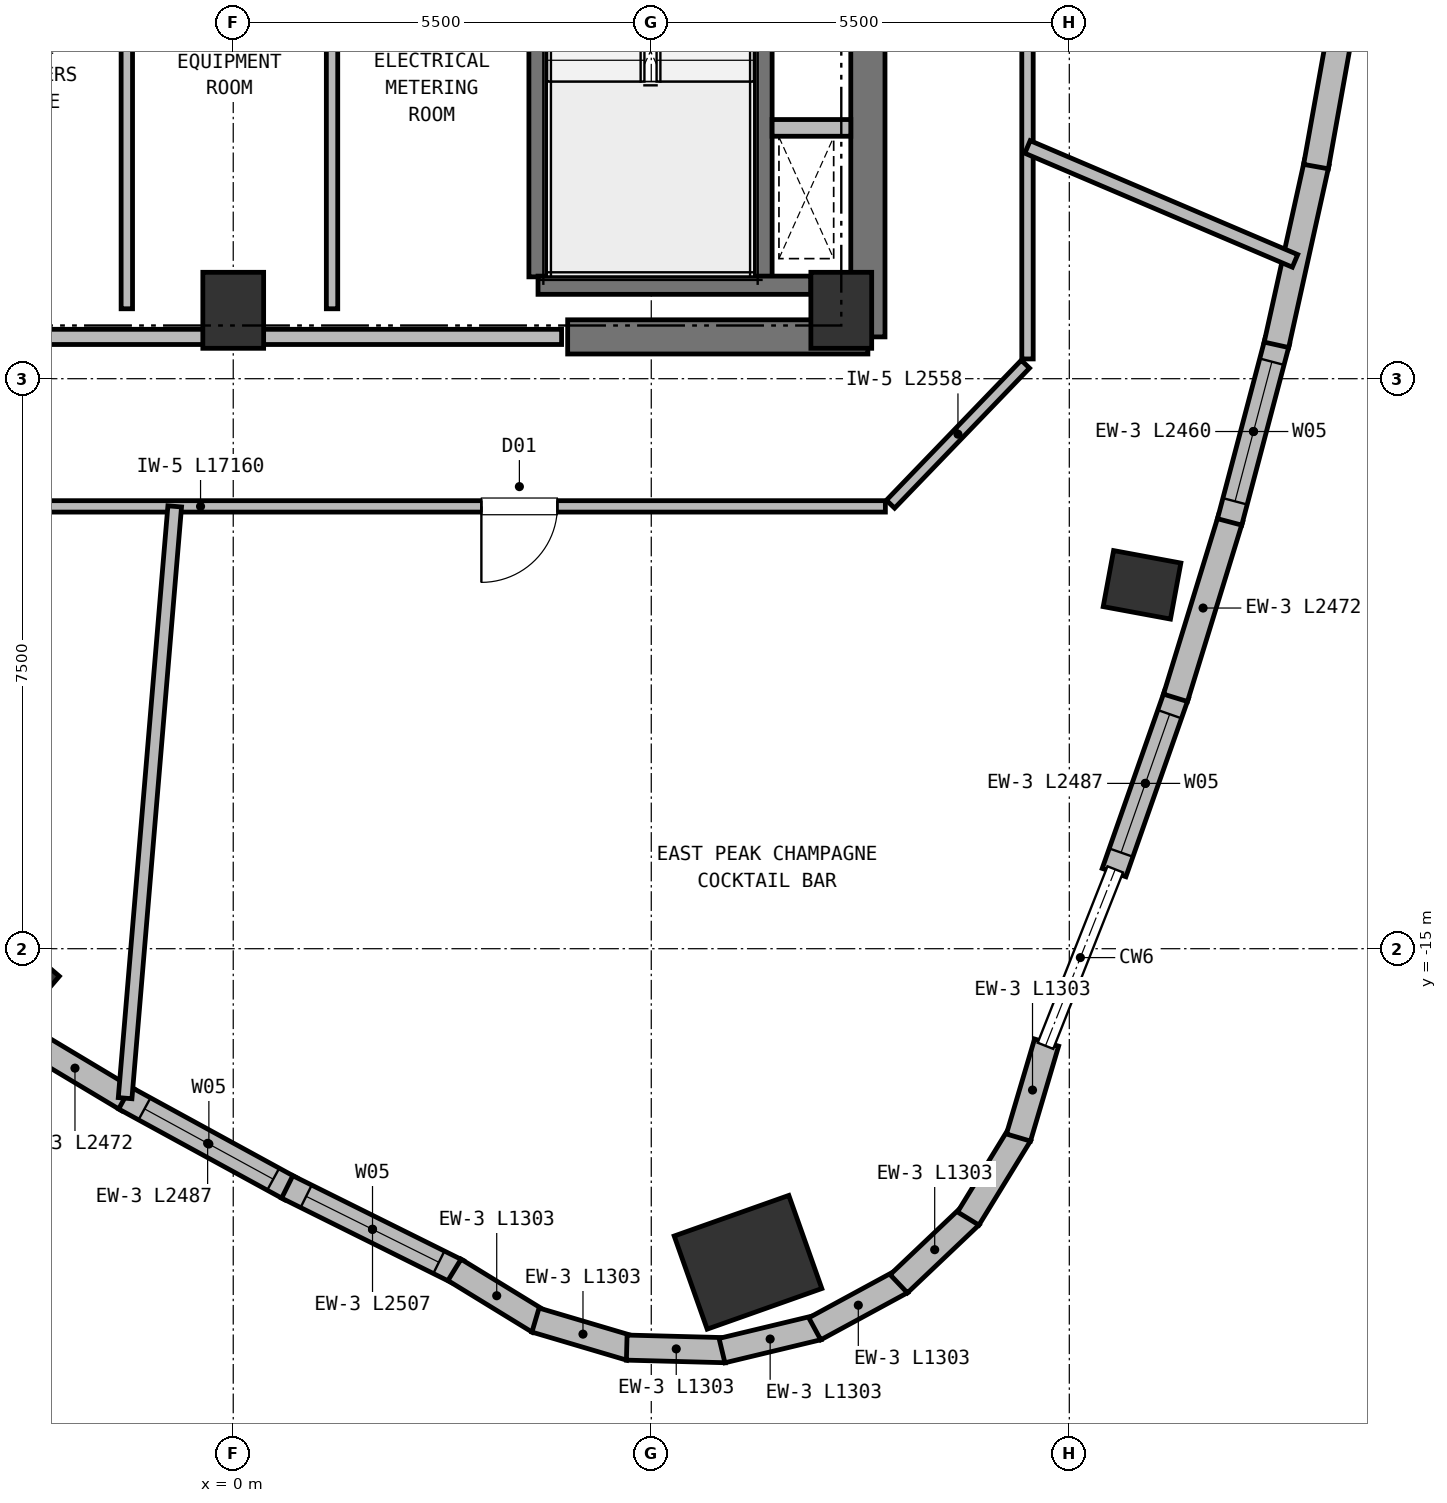
"""IFC4 building model, lengths in metres.
Left out: names, types, materials, properties, quantities, classifications, styles, units other than length and angle.
Written with IfcOpenShell. Run it as: python <this file> out.ifc"""

import sys

from ifc_helpers import new_model, si_unit, direction, frame, frame_2d, origin, origin_2d, place, context, subcontext, project, spatial, rectangle, extrude, element, fill, save


model = new_model("IFC4")
c1 = context("Model", 3, precision=1e-05, world=origin(), true_north=direction((0.0, 1.0)))
c2 = subcontext(c1, "Body", "Model", "MODEL_VIEW")
j1 = project(units=[si_unit("LENGTHUNIT", "METRE"), si_unit("PLANEANGLEUNIT", "RADIAN")], contexts=[c1])
p1 = place(None, origin())
s1 = spatial("IfcSite", under=j1, at=p1, CompositionType="ELEMENT")
p2 = place(p1, origin())
s2 = spatial("IfcBuilding", under=s1, at=p2, CompositionType="ELEMENT")
p3 = place(p2, frame((0.0, 0.0, 281.6)))
s3 = spatial("IfcBuildingStorey", under=s2, at=p3, CompositionType="ELEMENT", Elevation=281.6)
for number, where, z_axis, x_axis in (
    (1, (0.0, -6.6, 0.0), (0.0, 0.0, 1.0), (1.0, 0.0, 0.0)),
    (2, (8.0, -6.6, 0.0), (0.0, 0.0, 1.0), (1.0, 0.0, 0.0)),
):
    element("IfcColumn", number, at=place(p3, frame(where, z_axis=z_axis, x_axis=x_axis)), inside=s3, PredefinedType="COLUMN", context=c2, shape_type="SweptSolid", body=[
        extrude(rectangle(XDim=0.8, YDim=1.0, at=origin_2d()), origin(), (0.0, 0.0, 1.0), 4.4),
    ])
p4 = place(p3, frame((4.4, -6.95, 0.0), z_axis=(0.0, 0.0, 1.0), x_axis=(1.0, 0.0, 0.0)))
e3 = element("IfcWall", 3, at=p4, inside=s3, PredefinedType="SHEAR", context=c2, shape_type="SweptSolid", body=[
    extrude(rectangle(XDim=3.95, YDim=0.45, at=frame_2d((1.975, 0.0))), origin(), (0.0, 0.0, 1.0), 4.13),
])
p5 = place(p3, frame((8.35, -6.95, 0.0), z_axis=(0.0, 0.0, 1.0), x_axis=(0.0, 1.0, 0.0)))
e4 = element("IfcWall", 4, at=p5, inside=s3, PredefinedType="SHEAR", context=c2, shape_type="SweptSolid", body=[
    extrude(rectangle(XDim=8.1, YDim=0.45, at=frame_2d((4.05, 0.0))), origin(), (0.0, 0.0, 1.0), 4.13),
])
p6 = place(p3, frame((-2.865, -15.461, 0.0), z_axis=(0.0, 0.0, 1.0), x_axis=(-0.7604059656, 0.64944804833, 0.0)))
e5 = element("IfcColumn", 5, at=p6, inside=s3, PredefinedType="COLUMN", context=c2, shape_type="SweptSolid", body=[
    extrude(rectangle(XDim=0.75, YDim=0.9, at=origin_2d()), origin(), (0.0, 0.0, 1.0), 4.4),
])
p7 = place(p3, frame((6.773, -19.126, 0.0), z_axis=(0.0, 0.0, 1.0), x_axis=(-0.333806859234, 0.942641491092, 0.0)))
e6 = element("IfcColumn", 6, at=p7, inside=s3, PredefinedType="COLUMN", context=c2, shape_type="SweptSolid", body=[
    extrude(rectangle(XDim=1.3, YDim=1.6, at=origin_2d()), origin(), (0.0, 0.0, 1.0), 4.4),
])
p8 = place(p3, frame((11.957, -10.212, 0.0), z_axis=(0.0, 0.0, 1.0), x_axis=(0.182235525492, 0.983254907564, 0.0)))
e7 = element("IfcColumn", 7, at=p8, inside=s3, PredefinedType="COLUMN", context=c2, shape_type="SweptSolid", body=[
    extrude(rectangle(XDim=0.75, YDim=0.9, at=origin_2d()), origin(), (0.0, 0.0, 1.0), 4.4),
])
p9 = place(p3, frame((-1.385, -16.989, 0.0), z_axis=(0.0, 0.0, 1.0), x_axis=(-0.857841338579, 0.513914621143, 0.0)))
e8 = element("IfcWall", 8, at=p9, inside=s3, PredefinedType="SOLIDWALL", context=c2, shape_type="SweptSolid", body=[
    extrude(rectangle(XDim=2.472, YDim=0.33, at=frame_2d((1.236, 0.0))), origin(), (0.0, 0.0, 1.0), 4.13),
])
p10 = place(p3, frame((0.754, -18.157, 0.0), z_axis=(0.0, 0.0, 1.0), x_axis=(-0.877475074231, 0.479622241044, 0.0)))
e9 = element("IfcWall", 9, at=p10, inside=s3, PredefinedType="SOLIDWALL", context=c2, shape_type="SweptSolid", body=[
    extrude(rectangle(XDim=2.487, YDim=0.33, at=frame_2d((1.244, 0.0))), origin(), (0.0, 0.0, 1.0), 4.13),
])
p11 = place(p10, frame((0.26, 0.0, 0.72)))
e10 = element("IfcOpeningElement", 10, at=p11, cuts=e9, PredefinedType="OPENING", context=c2, shape_type="SweptSolid", body=[
    extrude(rectangle(XDim=1.93, YDim=2.15, at=frame_2d((0.965, 1.075))), frame((0.0, 0.175, 0.0), z_axis=(0.0, -1.0, 0.0), x_axis=(1.0, 0.0, 0.0)), (0.0, 0.0, 1.0), 0.35),
])
p12 = place(p3, frame((2.955, -19.25, 0.0), z_axis=(0.0, 0.0, 1.0), x_axis=(-0.895515434076, 0.445030456634, 0.0)))
e11 = element("IfcWall", 11, at=p12, inside=s3, PredefinedType="SOLIDWALL", context=c2, shape_type="SweptSolid", body=[
    extrude(rectangle(XDim=2.507, YDim=0.33, at=frame_2d((1.253, 0.0))), origin(), (0.0, 0.0, 1.0), 4.13),
])
p13 = place(p12, frame((0.278, 0.0, 0.72)))
e12 = element("IfcOpeningElement", 12, at=p13, cuts=e11, PredefinedType="OPENING", context=c2, shape_type="SweptSolid", body=[
    extrude(rectangle(XDim=1.95, YDim=2.15, at=frame_2d((0.975, 1.075))), frame((0.0, 0.175, 0.0), z_axis=(0.0, -1.0, 0.0), x_axis=(1.0, 0.0, 0.0)), (0.0, 0.0, 1.0), 0.35),
])
for number, where, z_axis, x_axis in (
    (13, (4.022, -19.906, 0.0), (0.0, 0.0, 1.0), (-0.853, 0.523, 0.0)),
    (14, (5.226, -20.256, 0.0), (0.0, 0.0, 1.0), (-0.959, 0.284, 0.0)),
):
    element("IfcWall", number, at=place(p3, frame(where, z_axis=z_axis, x_axis=x_axis)), inside=s3, PredefinedType="SOLIDWALL", context=c2, shape_type="SweptSolid", body=[
        extrude(rectangle(XDim=1.303, YDim=0.33, at=frame_2d((0.652, 0.0))), origin(), (0.0, 0.0, 1.0), 4.13),
    ])
for number, where, z_axis, x_axis in (
    (15, (6.48, -20.283, 0.0), (0.0, 0.0, 1.0), (-1.0, 0.026, 0.0)),
    (16, (7.698, -19.984, 0.0), (0.0, 0.0, 1.0), (-0.972, -0.233, 0.0)),
    (17, (8.796, -19.38, 0.0), (0.0, 0.0, 1.0), (-0.879, -0.477, 0.0)),
):
    element("IfcWall", number, at=place(p3, frame(where, z_axis=z_axis, x_axis=x_axis)), inside=s3, PredefinedType="SOLIDWALL", context=c2, shape_type="SweptSolid", body=[
        extrude(rectangle(XDim=1.303, YDim=0.33, at=frame_2d((0.651, 0.0))), origin(), (0.0, 0.0, 1.0), 4.13),
    ])
p14 = place(p3, frame((9.701, -18.512, 0.0), z_axis=(0.0, 0.0, 1.0), x_axis=(-0.725415712612, -0.688311008118, 0.0)))
e18 = element("IfcWall", 18, at=p14, inside=s3, PredefinedType="SOLIDWALL", context=c2, shape_type="SweptSolid", body=[
    extrude(rectangle(XDim=1.303, YDim=0.33, at=frame_2d((0.651, 0.0))), origin(), (0.0, 0.0, 1.0), 4.13),
])
p15 = place(p3, frame((10.351, -17.439, 0.0), z_axis=(0.0, 0.0, 1.0), x_axis=(-0.522601602676, -0.852577014047, 0.0)))
e19 = element("IfcWall", 19, at=p15, inside=s3, PredefinedType="SOLIDWALL", context=c2, shape_type="SweptSolid", body=[
    extrude(rectangle(XDim=1.303, YDim=0.33, at=frame_2d((0.651, 0.0))), origin(), (0.0, 0.0, 1.0), 4.13),
])
p16 = place(p3, frame((10.701, -16.235, 0.0), z_axis=(0.0, 0.0, 1.0), x_axis=(-0.284011785169, -0.958820789243, 0.0)))
e20 = element("IfcWall", 20, at=p16, inside=s3, PredefinedType="SOLIDWALL", context=c2, shape_type="SweptSolid", body=[
    extrude(rectangle(XDim=1.303, YDim=0.33, at=frame_2d((0.652, 0.0))), origin(), (0.0, 0.0, 1.0), 4.13),
])
p17 = place(p3, frame((12.413, -11.651, 0.0), z_axis=(0.0, 0.0, 1.0), x_axis=(-0.331176640599, -0.94356877477, 0.0)))
e21 = element("IfcWall", 21, at=p17, inside=s3, PredefinedType="SOLIDWALL", context=c2, shape_type="SweptSolid", body=[
    extrude(rectangle(XDim=2.487, YDim=0.33, at=frame_2d((1.244, 0.0))), origin(), (0.0, 0.0, 1.0), 4.13),
])
p18 = place(p17, frame((0.279, 0.0, 0.72)))
e22 = element("IfcOpeningElement", 22, at=p18, cuts=e21, PredefinedType="OPENING", context=c2, shape_type="SweptSolid", body=[
    extrude(rectangle(XDim=1.93, YDim=2.15, at=frame_2d((0.965, 1.075))), frame((0.0, 0.175, 0.0), z_axis=(0.0, -1.0, 0.0), x_axis=(1.0, 0.0, 0.0)), (0.0, 0.0, 1.0), 0.35),
])
p19 = place(p3, frame((13.123, -9.336, 0.0), z_axis=(0.0, 0.0, 1.0), x_axis=(-0.293558293962, -0.955941173946, 0.0)))
e23 = element("IfcWall", 23, at=p19, inside=s3, PredefinedType="SOLIDWALL", context=c2, shape_type="SweptSolid", body=[
    extrude(rectangle(XDim=2.472, YDim=0.33, at=frame_2d((1.236, 0.0))), origin(), (0.0, 0.0, 1.0), 4.13),
])
p20 = place(p3, frame((13.737, -7.006, 0.0), z_axis=(0.0, 0.0, 1.0), x_axis=(-0.255240594745, -0.966877571771, 0.0)))
e24 = element("IfcWall", 24, at=p20, inside=s3, PredefinedType="SOLIDWALL", context=c2, shape_type="SweptSolid", body=[
    extrude(rectangle(XDim=2.46, YDim=0.33, at=frame_2d((1.23, 0.0))), origin(), (0.0, 0.0, 1.0), 4.13),
])
p21 = place(p20, frame((0.28, 0.0, 0.72)))
e25 = element("IfcOpeningElement", 25, at=p21, cuts=e24, PredefinedType="OPENING", context=c2, shape_type="SweptSolid", body=[
    extrude(rectangle(XDim=1.9, YDim=2.15, at=frame_2d((0.95, 1.075))), frame((0.0, 0.175, 0.0), z_axis=(0.0, -1.0, 0.0), x_axis=(1.0, 0.0, 0.0)), (0.0, 0.0, 1.0), 0.35),
])
p22 = place(p3, frame((14.255, -4.66, 0.0), z_axis=(0.0, 0.0, 1.0), x_axis=(-0.216160793087, -0.976357778446, 0.0)))
e26 = element("IfcWall", 26, at=p22, inside=s3, PredefinedType="SOLIDWALL", context=c2, shape_type="SweptSolid", body=[
    extrude(rectangle(XDim=2.452, YDim=0.33, at=frame_2d((1.226, 0.0))), origin(), (0.0, 0.0, 1.0), 4.13),
])
p23 = place(p3, frame((14.677, -2.299, 0.0), z_axis=(0.0, 0.0, 1.0), x_axis=(-0.176418802695, -0.984315196497, 0.0)))
e27 = element("IfcWall", 27, at=p23, inside=s3, PredefinedType="SOLIDWALL", context=c2, shape_type="SweptSolid", body=[
    extrude(rectangle(XDim=2.448, YDim=0.33, at=frame_2d((1.224, 0.0))), origin(), (0.0, 0.0, 1.0), 4.13),
])
for number, where, z_axis, x_axis in (
    (28, (4.01, -6.16, 0.0), (0.0, 0.0, 1.0), (0.0, 1.0, 0.0)),
    (29, (6.97, -6.16, 0.0), (0.0, 0.0, 1.0), (0.0, 1.0, 0.0)),
):
    element("IfcWall", number, at=place(p3, frame(where, z_axis=z_axis, x_axis=x_axis)), inside=s3, PredefinedType="SHEAR", context=c2, shape_type="SweptSolid", body=[
        extrude(rectangle(XDim=7.22, YDim=0.24, at=frame_2d((3.61, 0.0))), origin(), (0.0, 0.0, 1.0), 4.13),
    ])
p24 = place(p3, frame((4.01, -6.27, 0.0), z_axis=(0.0, 0.0, 1.0), x_axis=(1.0, 0.0, 0.0)))
e30 = element("IfcWall", 30, at=p24, inside=s3, PredefinedType="SHEAR", context=c2, shape_type="SweptSolid", body=[
    extrude(rectangle(XDim=3.59, YDim=0.24, at=frame_2d((1.795, 0.0))), origin(), (0.0, 0.0, 1.0), 4.13),
])
p25 = place(p3, frame((7.09, -4.2, 0.0), z_axis=(0.0, 0.0, 1.0), x_axis=(1.0, 0.0, 0.0)))
e31 = element("IfcWall", 31, at=p25, inside=s3, PredefinedType="PARTITIONING", context=c2, shape_type="SweptSolid", body=[
    extrude(rectangle(XDim=1.035, YDim=0.22, at=frame_2d((0.518, 0.0))), origin(), (0.0, 0.0, 1.0), 4.13),
])
p26 = place(p3, frame((-4.32, -6.95, 0.0), z_axis=(0.0, 0.0, 1.0), x_axis=(1.0, 0.0, 0.0)))
e32 = element("IfcWall", 32, at=p26, inside=s3, PredefinedType="PARTITIONING", context=c2, shape_type="SweptSolid", body=[
    extrude(rectangle(XDim=8.64, YDim=0.2, at=frame_2d((4.32, 0.0))), origin(), (0.0, 0.0, 1.0), 4.13),
])
for number, where, z_axis, x_axis in (
    (33, (-1.4, -6.58, 0.0), (0.0, 0.0, 1.0), (0.0, 1.0, 0.0)),
    (34, (1.3, -6.58, 0.0), (0.0, 0.0, 1.0), (0.0, 1.0, 0.0)),
):
    element("IfcWall", number, at=place(p3, frame(where, z_axis=z_axis, x_axis=x_axis)), inside=s3, PredefinedType="PARTITIONING", context=c2, shape_type="SweptSolid", body=[
        extrude(rectangle(XDim=7.53, YDim=0.15, at=frame_2d((3.765, 0.0))), origin(), (0.0, 0.0, 1.0), 4.13),
    ])
p27 = place(p3, frame((8.58, -9.18, 0.0), z_axis=(0.0, 0.0, 1.0), x_axis=(-1.0, 0.0, 0.0)))
e35 = element("IfcWall", 35, at=p27, inside=s3, PredefinedType="PARTITIONING", context=c2, shape_type="SweptSolid", body=[
    extrude(rectangle(XDim=17.16, YDim=0.15, at=frame_2d((8.58, 0.0))), origin(), (0.0, 0.0, 1.0), 3.84),
])
p28 = place(p27, frame((12.705, 0.0, 0.0)))
e36 = element("IfcOpeningElement", 36, at=p28, cuts=e35, PredefinedType="OPENING", context=c2, shape_type="SweptSolid", body=[
    extrude(rectangle(XDim=1.0, YDim=2.15, at=frame_2d((0.5, 1.075))), frame((0.0, 0.085, 0.0), z_axis=(0.0, -1.0, 0.0), x_axis=(1.0, 0.0, 0.0)), (0.0, 0.0, 1.0), 0.17),
])
p29 = place(p27, frame((4.315, 0.0, 0.0)))
e37 = element("IfcOpeningElement", 37, at=p29, cuts=e35, PredefinedType="OPENING", context=c2, shape_type="SweptSolid", body=[
    extrude(rectangle(XDim=1.0, YDim=2.15, at=frame_2d((0.5, 1.075))), frame((0.0, 0.085, 0.0), z_axis=(0.0, -1.0, 0.0), x_axis=(1.0, 0.0, 0.0)), (0.0, 0.0, 1.0), 0.17),
])
p30 = place(p3, frame((10.422, -7.309, 0.0), z_axis=(0.0, 0.0, 1.0), x_axis=(-0.693764562202, -0.720201869085, 0.0)))
e38 = element("IfcWall", 38, at=p30, inside=s3, PredefinedType="PARTITIONING", context=c2, shape_type="SweptSolid", body=[
    extrude(rectangle(XDim=2.558, YDim=0.15, at=frame_2d((1.279, 0.0))), origin(), (0.0, 0.0, 1.0), 4.13),
])
p31 = place(p3, frame((10.45, 8.65, 0.0), z_axis=(0.0, 0.0, 1.0), x_axis=(0.0, -1.0, 0.0)))
e39 = element("IfcWall", 39, at=p31, inside=s3, PredefinedType="PARTITIONING", context=c2, shape_type="SweptSolid", body=[
    extrude(rectangle(XDim=15.89, YDim=0.15, at=frame_2d((7.945, 0.0))), origin(), (0.0, 0.0, 1.0), 3.83),
])
p32 = place(p31, frame((6.978, 0.0, 0.0)))
e40 = element("IfcOpeningElement", 40, at=p32, cuts=e39, PredefinedType="OPENING", context=c2, shape_type="SweptSolid", body=[
    extrude(rectangle(XDim=1.0, YDim=2.15, at=frame_2d((0.5, 1.075))), frame((0.0, 0.085, 0.0), z_axis=(0.0, -1.0, 0.0), x_axis=(1.0, 0.0, 0.0)), (0.0, 0.0, 1.0), 0.17),
])
p33 = place(p3, frame((-0.77, -9.18, 0.0), z_axis=(0.0, 0.0, 1.0), x_axis=(-0.083547101012, -0.996503829352, 0.0)))
e41 = element("IfcWall", 41, at=p33, inside=s3, PredefinedType="PARTITIONING", context=c2, shape_type="SweptSolid", body=[
    extrude(rectangle(XDim=7.814, YDim=0.18, at=frame_2d((3.907, 0.0))), origin(), (0.0, 0.0, 1.0), 3.71),
])
p34 = place(p3, frame((10.45, -4.451, 0.0), z_axis=(0.0, 0.0, 1.0), x_axis=(0.920037186276, -0.391831055264, 0.0)))
e42 = element("IfcWall", 42, at=p34, inside=s3, PredefinedType="PARTITIONING", context=c2, shape_type="SweptSolid", body=[
    extrude(rectangle(XDim=3.826, YDim=0.18, at=frame_2d((1.913, 0.0))), origin(), (0.0, 0.0, 1.0), 4.13),
])
p35 = place(p11, origin())
e43 = element("IfcWindow", 43, at=p35, inside=s3, PartitioningType="SINGLE_PANEL", PredefinedType="WINDOW", context=c2, shape_type="SweptSolid", body=[
    extrude(rectangle(XDim=1.93, YDim=2.15, at=frame_2d((0.965, 1.075))), frame((0.0, 0.03, 0.0), z_axis=(0.0, -1.0, 0.0), x_axis=(1.0, 0.0, 0.0)), (0.0, 0.0, 1.0), 0.06),
])
fill(e10, e43)
p36 = place(p13, origin())
e44 = element("IfcWindow", 44, at=p36, inside=s3, PartitioningType="SINGLE_PANEL", PredefinedType="WINDOW", context=c2, shape_type="SweptSolid", body=[
    extrude(rectangle(XDim=1.95, YDim=2.15, at=frame_2d((0.975, 1.075))), frame((0.0, 0.03, 0.0), z_axis=(0.0, -1.0, 0.0), x_axis=(1.0, 0.0, 0.0)), (0.0, 0.0, 1.0), 0.06),
])
fill(e12, e44)
p37 = place(p18, origin())
e45 = element("IfcWindow", 45, at=p37, inside=s3, PartitioningType="SINGLE_PANEL", PredefinedType="WINDOW", context=c2, shape_type="SweptSolid", body=[
    extrude(rectangle(XDim=1.93, YDim=2.15, at=frame_2d((0.965, 1.075))), frame((0.0, 0.03, 0.0), z_axis=(0.0, -1.0, 0.0), x_axis=(1.0, 0.0, 0.0)), (0.0, 0.0, 1.0), 0.06),
])
fill(e22, e45)
p38 = place(p21, origin())
e46 = element("IfcWindow", 46, at=p38, inside=s3, PartitioningType="SINGLE_PANEL", PredefinedType="WINDOW", context=c2, shape_type="SweptSolid", body=[
    extrude(rectangle(XDim=1.9, YDim=2.15, at=frame_2d((0.95, 1.075))), frame((0.0, 0.03, 0.0), z_axis=(0.0, -1.0, 0.0), x_axis=(1.0, 0.0, 0.0)), (0.0, 0.0, 1.0), 0.06),
])
fill(e25, e46)
p39 = place(p29, origin())
e47 = element("IfcDoor", 47, at=p39, inside=s3, OperationType="SINGLE_SWING_RIGHT", PredefinedType="DOOR", context=c2, shape_type="SweptSolid", body=[
    extrude(rectangle(XDim=1.0, YDim=2.15, at=frame_2d((0.5, 1.075))), frame((0.0, 0.025, 0.0), z_axis=(0.0, -1.0, 0.0), x_axis=(1.0, 0.0, 0.0)), (0.0, 0.0, 1.0), 0.05),
])
fill(e37, e47)
save(model, sys.argv[1])
